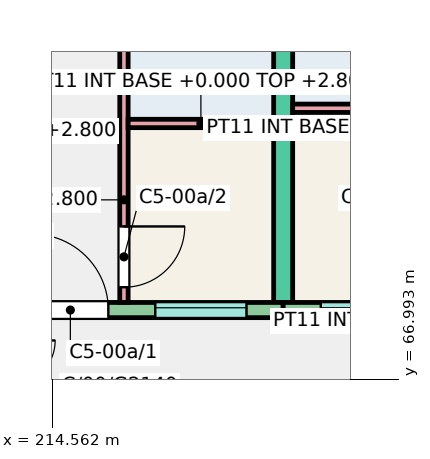
"""IFC4 building model, lengths in metres.
Left out: names, types, materials, properties, quantities, classifications, styles, units other than length and angle.
Written with IfcOpenShell. Run it as: python <this file> out.ifc"""

import sys

from ifc_helpers import new_model, si_unit, direction, frame, frame_2d, origin, place, context, subcontext, project, spatial, rectangle, extrude, element, fill, save


model = new_model("IFC4")
c1 = context("Model", 3, precision=1e-05, world=origin(), true_north=direction((0.0, 1.0)))
c2 = subcontext(c1, "Body", "Model", "MODEL_VIEW")
j1 = project(units=[si_unit("LENGTHUNIT", "METRE"), si_unit("PLANEANGLEUNIT", "RADIAN")], contexts=[c1])
p1 = place(None, origin())
s1 = spatial("IfcSite", under=j1, at=p1, CompositionType="ELEMENT")
p2 = place(p1, origin())
s2 = spatial("IfcBuilding", under=s1, at=p2, CompositionType="ELEMENT")
p3 = place(p2, origin())
s3 = spatial("IfcBuildingStorey", under=s2, at=p3, CompositionType="ELEMENT", Elevation=0.0)
p4 = place(p3, frame((217.6, 68.0, -0.25), z_axis=(0.0, 0.0, 1.0), x_axis=(0.0, 1.0, 0.0)))
e1 = element("IfcWall", 1, at=p4, inside=s3, PredefinedType="SHEAR", context=c2, shape_type="SweptSolid", body=[
    extrude(rectangle(XDim=9.0, YDim=0.25, at=frame_2d((4.5, 0.0))), origin(), (0.0, 0.0, 1.0), 3.25),
])
p5 = place(p3, frame((214.15, 67.9, -0.25), z_axis=(0.0, 0.0, 1.0), x_axis=(1.0, 0.0, 0.0)))
e2 = element("IfcWall", 2, at=p5, inside=s3, PredefinedType="SOLIDWALL", context=c2, shape_type="SweptSolid", body=[
    extrude(rectangle(XDim=3.45, YDim=0.2, at=frame_2d((1.725, 0.0))), origin(), (0.0, 0.0, 1.0), 3.25),
])
p6 = place(p5, frame((1.768, 0.0, 1.35)))
e3 = element("IfcOpeningElement", 3, at=p6, cuts=e2, PredefinedType="OPENING", context=c2, shape_type="SweptSolid", body=[
    extrude(rectangle(XDim=1.2, YDim=1.3, at=frame_2d((0.6, 0.65))), frame((0.0, 0.11, 0.0), z_axis=(0.0, -1.0, 0.0), x_axis=(1.0, 0.0, 0.0)), (0.0, 0.0, 1.0), 0.22),
])
p7 = place(p5, frame((0.15, 0.0, 0.25)))
e4 = element("IfcOpeningElement", 4, at=p7, cuts=e2, PredefinedType="OPENING", context=c2, shape_type="SweptSolid", body=[
    extrude(rectangle(XDim=1.0, YDim=2.1, at=frame_2d((0.5, 1.05))), frame((0.0, 0.11, 0.0), z_axis=(0.0, -1.0, 0.0), x_axis=(1.0, 0.0, 0.0)), (0.0, 0.0, 1.0), 0.22),
])
p8 = place(p3, frame((217.6, 67.9, -0.25), z_axis=(0.0, 0.0, 1.0), x_axis=(1.0, 0.0, 0.0)))
e5 = element("IfcWall", 5, at=p8, inside=s3, PredefinedType="SOLIDWALL", context=c2, shape_type="SweptSolid", body=[
    extrude(rectangle(XDim=3.6, YDim=0.2, at=frame_2d((1.8, 0.0))), origin(), (0.0, 0.0, 1.0), 3.25),
])
p9 = place(p8, frame((0.495, 0.0, 1.35)))
e6 = element("IfcOpeningElement", 6, at=p9, cuts=e5, PredefinedType="OPENING", context=c2, shape_type="SweptSolid", body=[
    extrude(rectangle(XDim=1.2, YDim=1.3, at=frame_2d((0.6, 0.65))), frame((0.0, 0.11, 0.0), z_axis=(0.0, -1.0, 0.0), x_axis=(1.0, 0.0, 0.0)), (0.0, 0.0, 1.0), 0.22),
])
p10 = place(p8, frame((2.325, 0.0, 0.25)))
e7 = element("IfcOpeningElement", 7, at=p10, cuts=e5, PredefinedType="OPENING", context=c2, shape_type="SweptSolid", body=[
    extrude(rectangle(XDim=1.0, YDim=2.1, at=frame_2d((0.5, 1.05))), frame((0.0, 0.11, 0.0), z_axis=(0.0, -1.0, 0.0), x_axis=(1.0, 0.0, 0.0)), (0.0, 0.0, 1.0), 0.22),
])
p11 = place(p3, frame((215.505, 68.0, 0.0), z_axis=(0.0, 0.0, 1.0), x_axis=(0.0, 1.0, 0.0)))
e8 = element("IfcWall", 8, at=p11, inside=s3, PredefinedType="PARTITIONING", context=c2, shape_type="SweptSolid", body=[
    extrude(rectangle(XDim=4.5, YDim=0.11, at=frame_2d((2.25, 0.0))), origin(), (0.0, 0.0, 1.0), 2.8),
])
p12 = place(p11, frame((0.2, 0.0, 0.0)))
e9 = element("IfcOpeningElement", 9, at=p12, cuts=e8, PredefinedType="OPENING", context=c2, shape_type="SweptSolid", body=[
    extrude(rectangle(XDim=0.8, YDim=2.1, at=frame_2d((0.4, 1.05))), frame((0.0, 0.065, 0.0), z_axis=(0.0, -1.0, 0.0), x_axis=(1.0, 0.0, 0.0)), (0.0, 0.0, 1.0), 0.13),
])
p13 = place(p11, frame((3.55, 0.0, 0.0)))
e10 = element("IfcOpeningElement", 10, at=p13, cuts=e8, PredefinedType="OPENING", context=c2, shape_type="SweptSolid", body=[
    extrude(rectangle(XDim=0.8, YDim=2.1, at=frame_2d((0.4, 1.05))), frame((0.0, 0.065, 0.0), z_axis=(0.0, -1.0, 0.0), x_axis=(1.0, 0.0, 0.0)), (0.0, 0.0, 1.0), 0.13),
])
p14 = place(p3, frame((215.56, 70.355, 0.0), z_axis=(0.0, 0.0, 1.0), x_axis=(1.0, 0.0, 0.0)))
e11 = element("IfcWall", 11, at=p14, inside=s3, PredefinedType="PARTITIONING", context=c2, shape_type="SweptSolid", body=[
    extrude(rectangle(XDim=1.915, YDim=0.11, at=frame_2d((0.958, 0.0))), origin(), (0.0, 0.0, 1.0), 2.8),
])
p15 = place(p3, frame((217.725, 70.555, 0.0), z_axis=(0.0, 0.0, 1.0), x_axis=(1.0, 0.0, 0.0)))
e12 = element("IfcWall", 12, at=p15, inside=s3, PredefinedType="PARTITIONING", context=c2, shape_type="SweptSolid", body=[
    extrude(rectangle(XDim=1.94, YDim=0.11, at=frame_2d((0.97, 0.0))), origin(), (0.0, 0.0, 1.0), 2.8),
])
p16 = place(p6, origin())
e13 = element("IfcWindow", 13, at=p16, inside=s3, PartitioningType="SINGLE_PANEL", PredefinedType="WINDOW", context=c2, shape_type="SweptSolid", body=[
    extrude(rectangle(XDim=1.2, YDim=1.3, at=frame_2d((0.6, 0.65))), frame((0.0, 0.06, 0.0), z_axis=(0.0, -1.0, 0.0), x_axis=(1.0, 0.0, 0.0)), (0.0, 0.0, 1.0), 0.06),
])
fill(e3, e13)
p17 = place(p9, origin())
e14 = element("IfcWindow", 14, at=p17, inside=s3, PartitioningType="SINGLE_PANEL", PredefinedType="WINDOW", context=c2, shape_type="SweptSolid", body=[
    extrude(rectangle(XDim=1.2, YDim=1.3, at=frame_2d((0.6, 0.65))), frame((0.0, 0.06, 0.0), z_axis=(0.0, -1.0, 0.0), x_axis=(1.0, 0.0, 0.0)), (0.0, 0.0, 1.0), 0.06),
])
fill(e6, e14)
p18 = place(p7, origin())
e15 = element("IfcDoor", 15, at=p18, inside=s3, OperationType="SINGLE_SWING_LEFT", PredefinedType="DOOR", context=c2, shape_type="SweptSolid", body=[
    extrude(rectangle(XDim=1.0, YDim=2.1, at=frame_2d((0.5, 1.05))), frame((0.0, 0.025, 0.0), z_axis=(0.0, -1.0, 0.0), x_axis=(1.0, 0.0, 0.0)), (0.0, 0.0, 1.0), 0.05),
])
fill(e4, e15)
p19 = place(p12, origin())
e16 = element("IfcDoor", 16, at=p19, inside=s3, OperationType="SINGLE_SWING_RIGHT", PredefinedType="DOOR", context=c2, shape_type="SweptSolid", body=[
    extrude(rectangle(XDim=0.8, YDim=2.1, at=frame_2d((0.4, 1.05))), frame((0.0, 0.025, 0.0), z_axis=(0.0, -1.0, 0.0), x_axis=(1.0, 0.0, 0.0)), (0.0, 0.0, 1.0), 0.05),
])
fill(e9, e16)
save(model, sys.argv[1])
